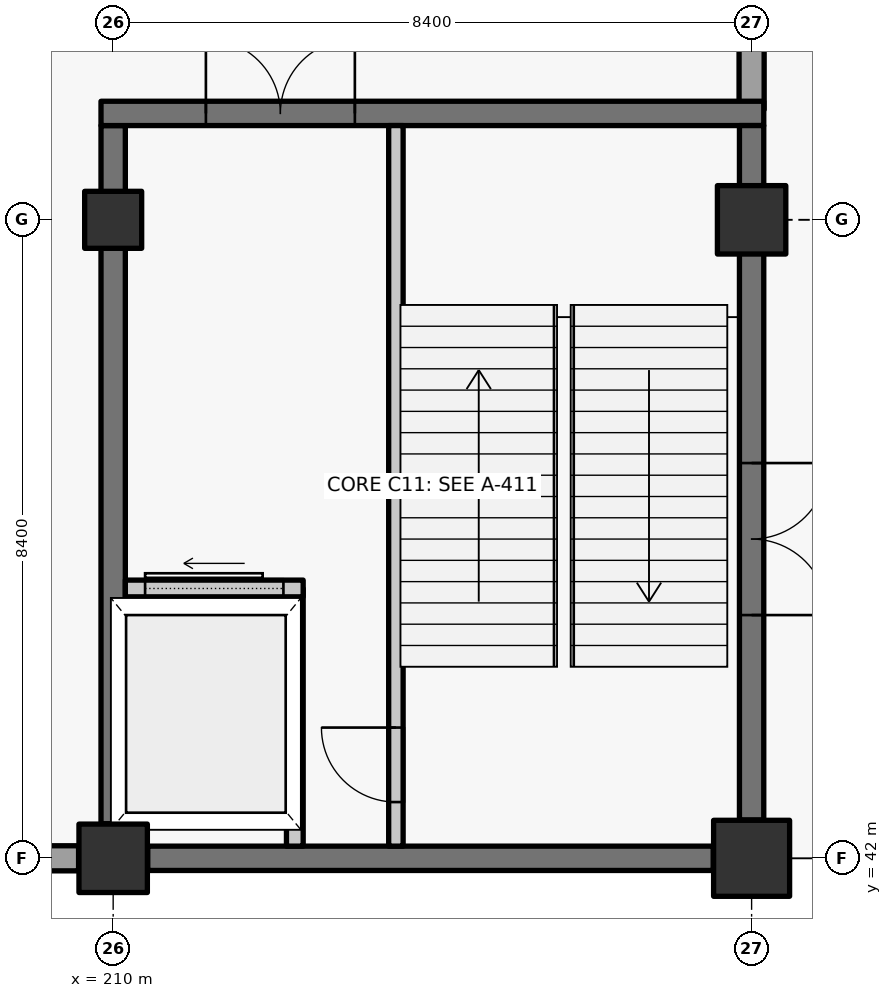
"""IFC4 building model, lengths in metres.
Left out: names, types, materials, properties, quantities, classifications, styles, units other than length and angle.
Written with IfcOpenShell. Run it as: python <this file> out.ifc"""

import sys

from ifc_helpers import new_model, si_unit, direction, frame, frame_2d, origin, origin_2d, place, context, subcontext, project, spatial, rectangle, extrude, element, fill, save


model = new_model("IFC4")
c1 = context("Model", 3, precision=1e-05, world=origin(), true_north=direction((0.0, 1.0)))
c2 = subcontext(c1, "Body", "Model", "MODEL_VIEW")
j1 = project(units=[si_unit("LENGTHUNIT", "METRE"), si_unit("PLANEANGLEUNIT", "RADIAN")], contexts=[c1])
p1 = place(None, origin())
s1 = spatial("IfcSite", under=j1, at=p1, CompositionType="ELEMENT")
p2 = place(p1, origin())
s2 = spatial("IfcBuilding", under=s1, at=p2, CompositionType="ELEMENT")
p3 = place(p2, origin())
s3 = spatial("IfcBuildingStorey", under=s2, at=p3, CompositionType="ELEMENT", Elevation=0.0)
p4 = place(p3, frame((210.0, 42.0, -0.36), z_axis=(0.0, 0.0, 1.0), x_axis=(1.0, 0.0, 0.0)))
e1 = element("IfcColumn", 1, at=p4, inside=s3, PredefinedType="COLUMN", context=c2, shape_type="SweptSolid", body=[
    extrude(rectangle(XDim=0.9, YDim=0.9, at=origin_2d()), origin(), (0.0, 0.0, 1.0), 6.36),
])
p5 = place(p3, frame((210.0, 50.4, -0.36), z_axis=(0.0, 0.0, 1.0), x_axis=(1.0, 0.0, 0.0)))
e2 = element("IfcColumn", 2, at=p5, inside=s3, PredefinedType="COLUMN", context=c2, shape_type="SweptSolid", body=[
    extrude(rectangle(XDim=0.75, YDim=0.75, at=origin_2d()), origin(), (0.0, 0.0, 1.0), 6.36),
])
p6 = place(p3, frame((218.4, 42.0, -0.36), z_axis=(0.0, 0.0, 1.0), x_axis=(1.0, 0.0, 0.0)))
e3 = element("IfcColumn", 3, at=p6, inside=s3, PredefinedType="COLUMN", context=c2, shape_type="SweptSolid", body=[
    extrude(rectangle(XDim=1.0, YDim=1.0, at=origin_2d()), origin(), (0.0, 0.0, 1.0), 6.36),
])
p7 = place(p3, frame((218.4, 50.4, -0.36), z_axis=(0.0, 0.0, 1.0), x_axis=(1.0, 0.0, 0.0)))
e4 = element("IfcColumn", 4, at=p7, inside=s3, PredefinedType="COLUMN", context=c2, shape_type="SweptSolid", body=[
    extrude(rectangle(XDim=0.9, YDim=0.9, at=origin_2d()), origin(), (0.0, 0.0, 1.0), 6.36),
])
p8 = place(p3, frame((218.4, 58.345, 0.0), z_axis=(0.0, 0.0, 1.0), x_axis=(0.0, -1.0, 0.0)))
e5 = element("IfcWall", 5, at=p8, inside=s3, PredefinedType="SOLIDWALL", context=c2, shape_type="SweptSolid", body=[
    extrude(rectangle(XDim=6.495, YDim=0.33, at=frame_2d((3.248, 0.0))), origin(), (0.0, 0.0, 1.0), 5.28),
])
p9 = place(p8, frame((2.06, 0.0, 0.0)))
e6 = element("IfcOpeningElement", 6, at=p9, cuts=e5, PredefinedType="OPENING", context=c2, shape_type="SweptSolid", body=[
    extrude(rectangle(XDim=2.4, YDim=2.6, at=frame_2d((1.2, 1.3))), frame((0.0, 0.175, 0.0), z_axis=(0.0, -1.0, 0.0), x_axis=(1.0, 0.0, 0.0)), (0.0, 0.0, 1.0), 0.35),
])
p10 = place(p3, frame((209.545, 42.0, 0.0), z_axis=(0.0, 0.0, 1.0), x_axis=(-1.0, 0.0, 0.0)))
e7 = element("IfcWall", 7, at=p10, inside=s3, PredefinedType="SOLIDWALL", context=c2, shape_type="SweptSolid", body=[
    extrude(rectangle(XDim=7.49, YDim=0.33, at=frame_2d((3.745, 0.0))), origin(), (0.0, 0.0, 1.0), 5.23),
])
p11 = place(p10, frame((2.785, 0.0, 0.0)))
e8 = element("IfcOpeningElement", 8, at=p11, cuts=e7, PredefinedType="OPENING", context=c2, shape_type="SweptSolid", body=[
    extrude(rectangle(XDim=1.92, YDim=2.32, at=frame_2d((0.96, 1.16))), frame((0.0, 0.175, 0.0), z_axis=(0.0, -1.0, 0.0), x_axis=(1.0, 0.0, 0.0)), (0.0, 0.0, 1.0), 0.35),
])
p12 = place(p3, frame((217.895, 42.0, -0.36), z_axis=(0.0, 0.0, 1.0), x_axis=(-1.0, 0.0, 0.0)))
e9 = element("IfcWall", 9, at=p12, inside=s3, PredefinedType="SHEAR", context=c2, shape_type="SweptSolid", body=[
    extrude(rectangle(XDim=7.44, YDim=0.32, at=frame_2d((3.72, 0.0))), origin(), (0.0, 0.0, 1.0), 6.08),
])
p13 = place(p3, frame((210.0, 42.455, -0.36), z_axis=(0.0, 0.0, 1.0), x_axis=(0.0, 1.0, 0.0)))
e10 = element("IfcWall", 10, at=p13, inside=s3, PredefinedType="SHEAR", context=c2, shape_type="SweptSolid", body=[
    extrude(rectangle(XDim=9.185, YDim=0.32, at=frame_2d((4.592, 0.0))), origin(), (0.0, 0.0, 1.0), 6.08),
])
p14 = place(p3, frame((209.84, 51.8, -0.36), z_axis=(0.0, 0.0, 1.0), x_axis=(1.0, 0.0, 0.0)))
e11 = element("IfcWall", 11, at=p14, inside=s3, PredefinedType="SHEAR", context=c2, shape_type="SweptSolid", body=[
    extrude(rectangle(XDim=8.72, YDim=0.32, at=frame_2d((4.36, 0.0))), origin(), (0.0, 0.0, 1.0), 6.08),
])
p15 = place(p14, frame((1.38, 0.0, 0.36)))
e12 = element("IfcOpeningElement", 12, at=p15, cuts=e11, PredefinedType="OPENING", context=c2, shape_type="SweptSolid", body=[
    extrude(rectangle(XDim=1.96, YDim=2.2, at=frame_2d((0.98, 1.1))), frame((0.0, 0.17, 0.0), z_axis=(0.0, -1.0, 0.0), x_axis=(1.0, 0.0, 0.0)), (0.0, 0.0, 1.0), 0.34),
])
p16 = place(p3, frame((218.4, 51.64, -0.36), z_axis=(0.0, 0.0, 1.0), x_axis=(0.0, -1.0, 0.0)))
e13 = element("IfcWall", 13, at=p16, inside=s3, PredefinedType="SHEAR", context=c2, shape_type="SweptSolid", body=[
    extrude(rectangle(XDim=9.135, YDim=0.32, at=frame_2d((4.567, 0.0))), origin(), (0.0, 0.0, 1.0), 6.08),
])
p17 = place(p16, frame((4.44, 0.0, 0.36)))
e14 = element("IfcOpeningElement", 14, at=p17, cuts=e13, PredefinedType="OPENING", context=c2, shape_type="SweptSolid", body=[
    extrude(rectangle(XDim=2.0, YDim=2.28, at=frame_2d((1.0, 1.14))), frame((0.0, 0.17, 0.0), z_axis=(0.0, -1.0, 0.0), x_axis=(1.0, 0.0, 0.0)), (0.0, 0.0, 1.0), 0.34),
])
p18 = place(p3, frame((213.72, 42.16, -0.36), z_axis=(0.0, 0.0, 1.0), x_axis=(0.0, 1.0, 0.0)))
e15 = element("IfcWall", 15, at=p18, inside=s3, PredefinedType="SOLIDWALL", context=c2, shape_type="SweptSolid", body=[
    extrude(rectangle(XDim=9.48, YDim=0.19, at=frame_2d((4.74, 0.0))), origin(), (0.0, 0.0, 1.0), 6.08),
])
p19 = place(p18, frame((0.58, 0.0, 0.36)))
e16 = element("IfcOpeningElement", 16, at=p19, cuts=e15, PredefinedType="OPENING", context=c2, shape_type="SweptSolid", body=[
    extrude(rectangle(XDim=0.98, YDim=2.15, at=frame_2d((0.49, 1.075))), frame((0.0, 0.105, 0.0), z_axis=(0.0, -1.0, 0.0), x_axis=(1.0, 0.0, 0.0)), (0.0, 0.0, 1.0), 0.21),
])
p20 = place(p3, frame((212.39, 42.16, 0.0), z_axis=(0.0, 0.0, 1.0), x_axis=(0.0, 1.0, 0.0)))
e17 = element("IfcWall", 17, at=p20, inside=s3, PredefinedType="SOLIDWALL", context=c2, shape_type="SweptSolid", body=[
    extrude(rectangle(XDim=3.39, YDim=0.22, at=frame_2d((1.695, 0.0))), origin(), (0.0, 0.0, 1.0), 5.72),
])
p21 = place(p3, frame((210.16, 45.55, 0.0), z_axis=(0.0, 0.0, 1.0), x_axis=(1.0, 0.0, 0.0)))
e18 = element("IfcWall", 18, at=p21, inside=s3, PredefinedType="SOLIDWALL", context=c2, shape_type="SweptSolid", body=[
    extrude(rectangle(XDim=2.34, YDim=0.22, at=frame_2d((1.17, 0.0))), origin(), (0.0, 0.0, 1.0), 5.72),
])
p22 = place(p21, frame((0.26, 0.0, 0.0)))
e19 = element("IfcOpeningElement", 19, at=p22, cuts=e18, PredefinedType="OPENING", context=c2, shape_type="SweptSolid", body=[
    extrude(rectangle(XDim=1.82, YDim=2.4, at=frame_2d((0.91, 1.2))), frame((0.0, 0.12, 0.0), z_axis=(0.0, -1.0, 0.0), x_axis=(1.0, 0.0, 0.0)), (0.0, 0.0, 1.0), 0.24),
])
p23 = place(p19, origin())
e20 = element("IfcDoor", 20, at=p23, inside=s3, OperationType="SINGLE_SWING_RIGHT", PredefinedType="DOOR", context=c2, shape_type="SweptSolid", body=[
    extrude(rectangle(XDim=0.98, YDim=2.15, at=frame_2d((0.49, 1.075))), frame((0.0, 0.025, 0.0), z_axis=(0.0, -1.0, 0.0), x_axis=(1.0, 0.0, 0.0)), (0.0, 0.0, 1.0), 0.05),
])
fill(e16, e20)
p24 = place(p15, origin())
e21 = element("IfcDoor", 21, at=p24, inside=s3, OperationType="DOUBLE_DOOR_SINGLE_SWING", PredefinedType="DOOR", context=c2, shape_type="SweptSolid", body=[
    extrude(rectangle(XDim=1.96, YDim=2.2, at=frame_2d((0.98, 1.1))), frame((0.0, 0.025, 0.0), z_axis=(0.0, -1.0, 0.0), x_axis=(1.0, 0.0, 0.0)), (0.0, 0.0, 1.0), 0.05),
])
fill(e12, e21)
p25 = place(p17, origin())
e22 = element("IfcDoor", 22, at=p25, inside=s3, OperationType="DOUBLE_DOOR_SINGLE_SWING", PredefinedType="DOOR", context=c2, shape_type="SweptSolid", body=[
    extrude(rectangle(XDim=2.0, YDim=2.28, at=frame_2d((1.0, 1.14))), frame((0.0, 0.025, 0.0), z_axis=(0.0, -1.0, 0.0), x_axis=(1.0, 0.0, 0.0)), (0.0, 0.0, 1.0), 0.05),
])
fill(e14, e22)
p26 = place(p22, origin())
e23 = element("IfcDoor", 23, at=p26, inside=s3, OperationType="SLIDING_TO_LEFT", PredefinedType="DOOR", context=c2, shape_type="SweptSolid", body=[
    extrude(rectangle(XDim=1.82, YDim=2.4, at=frame_2d((0.91, 1.2))), frame((0.0, 0.025, 0.0), z_axis=(0.0, -1.0, 0.0), x_axis=(1.0, 0.0, 0.0)), (0.0, 0.0, 1.0), 0.05),
])
fill(e19, e23)
save(model, sys.argv[1])
